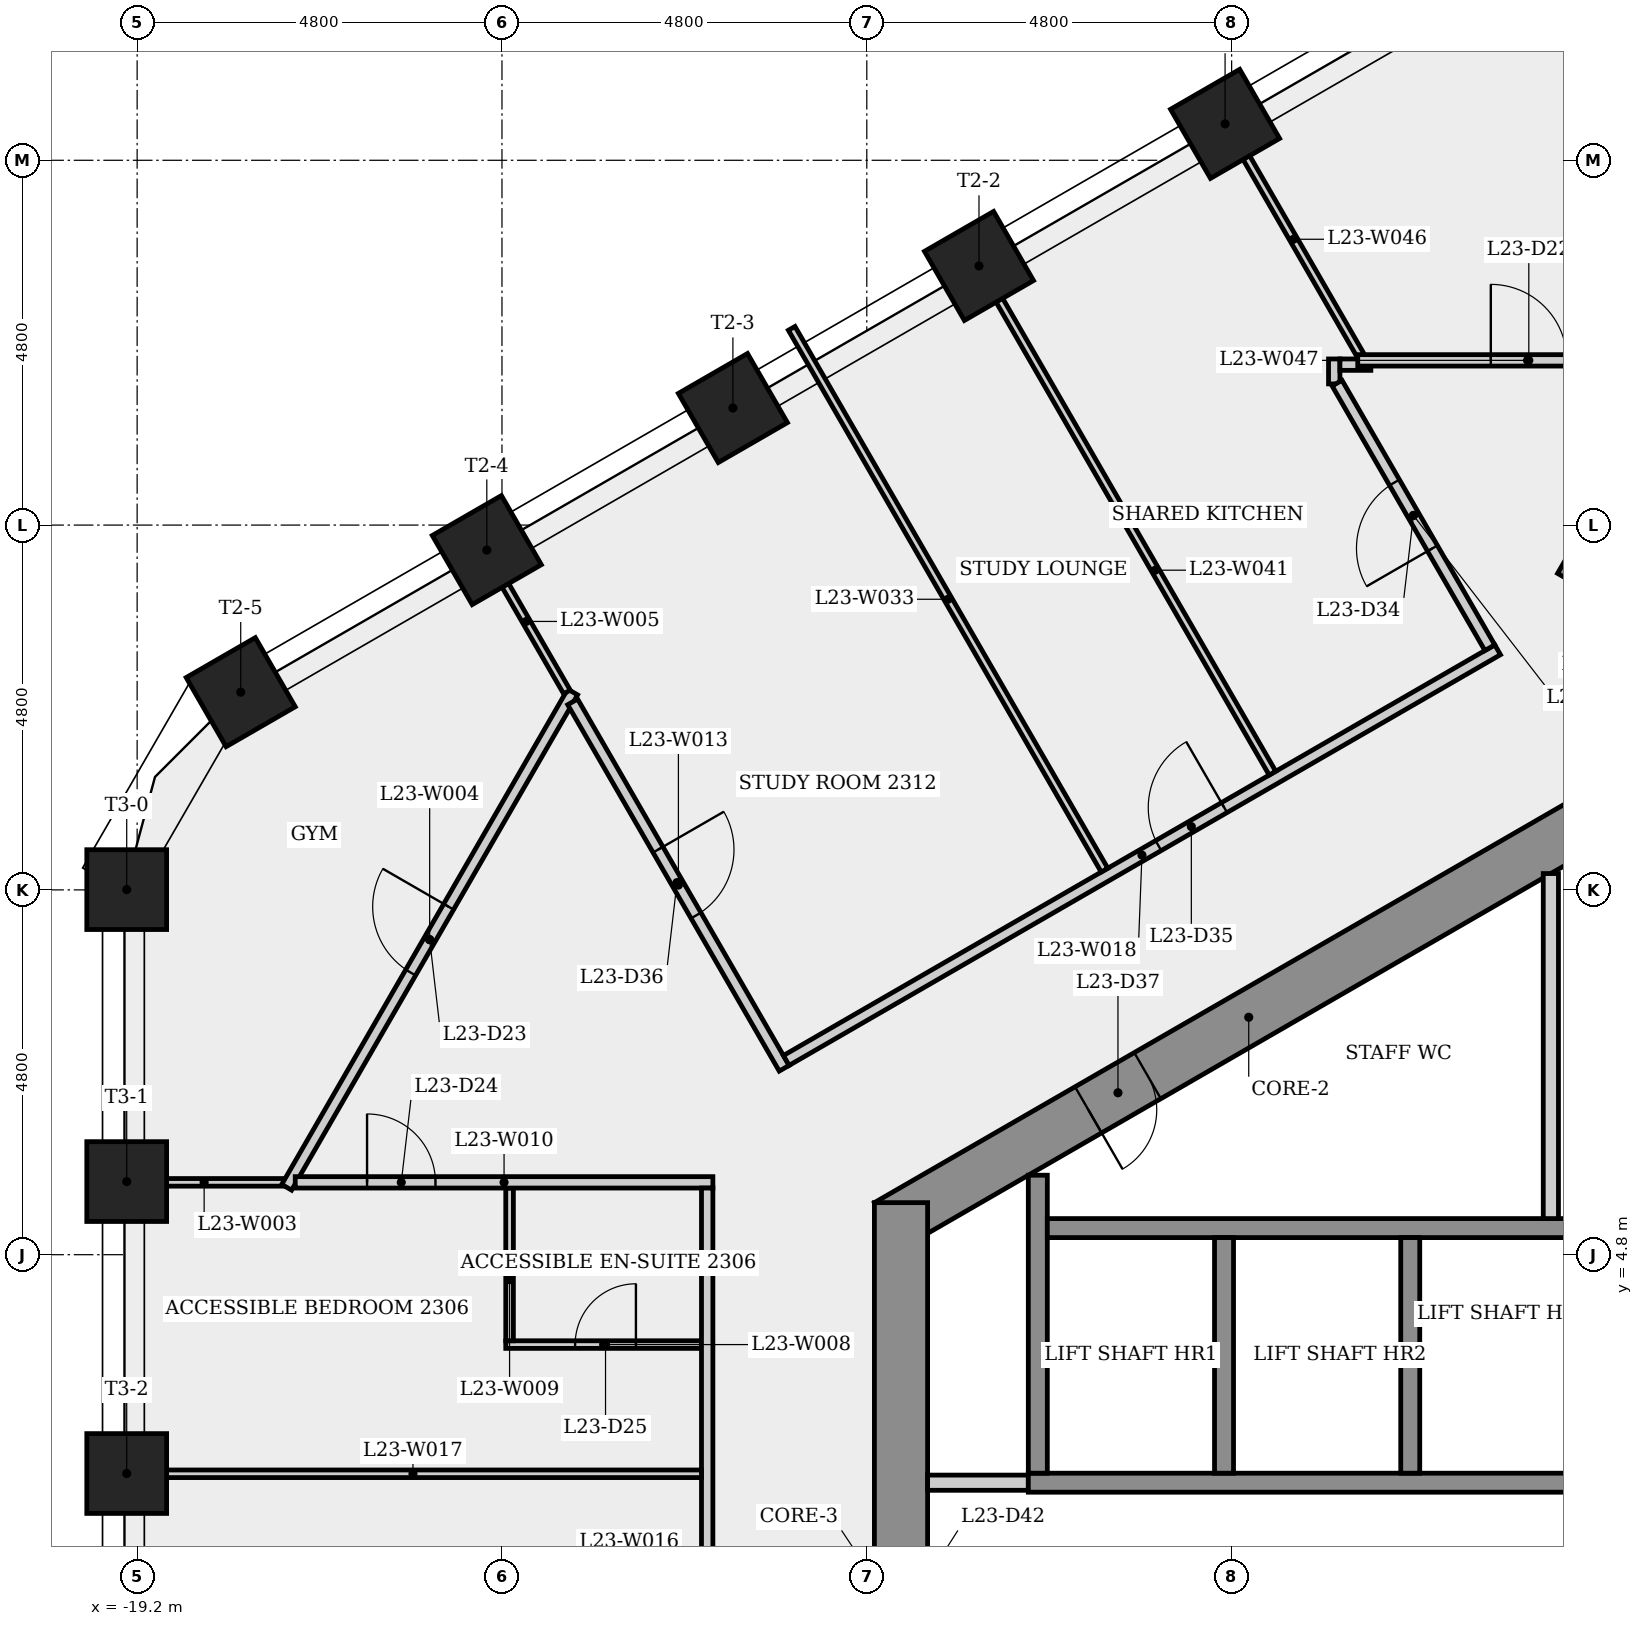
"""IFC4 building model, lengths in metres.
Left out: names, types, materials, properties, quantities, classifications, styles, units other than length and angle.
Written with IfcOpenShell. Run it as: python <this file> out.ifc"""

import sys

from ifc_helpers import new_model, si_unit, direction, frame, frame_2d, origin, origin_2d, place, context, subcontext, project, spatial, rectangle, extrude, element, fill, save


model = new_model("IFC4")
c1 = context("Model", 3, precision=1e-05, world=origin(), true_north=direction((0.0, 1.0)))
c2 = subcontext(c1, "Body", "Model", "MODEL_VIEW")
j1 = project(units=[si_unit("LENGTHUNIT", "METRE"), si_unit("PLANEANGLEUNIT", "RADIAN")], contexts=[c1])
p1 = place(None, origin())
s1 = spatial("IfcSite", under=j1, at=p1, CompositionType="ELEMENT")
p2 = place(p1, origin())
s2 = spatial("IfcBuilding", under=s1, at=p2, CompositionType="ELEMENT")
p3 = place(p2, frame((0.0, 0.0, 89.9)))
s3 = spatial("IfcBuildingStorey", under=s2, at=p3, CompositionType="ELEMENT", Elevation=89.9)
p4 = place(p3, frame((0.175, 10.667, 0.0), z_axis=(0.0, 0.0, 1.0), x_axis=(-0.866023993627, -0.500002442456, 0.0)))
e1 = element("IfcWall", 1, at=p4, inside=s3, PredefinedType="SHEAR", context=c2, shape_type="SweptSolid", body=[
    extrude(rectangle(XDim=10.97, YDim=0.7, at=frame_2d((5.485, 0.0))), origin(), (0.0, 0.0, 1.0), 3.4),
])
p5 = place(p4, frame((7.021, 0.0, 0.0)))
e2 = element("IfcOpeningElement", 2, at=p5, cuts=e1, PredefinedType="OPENING", context=c2, shape_type="SweptSolid", body=[
    extrude(rectangle(XDim=0.9, YDim=2.1, at=frame_2d((0.45, 1.05))), frame((0.0, 0.36, 0.0), z_axis=(0.0, -1.0, 0.0), x_axis=(1.0, 0.0, 0.0)), (0.0, 0.0, 1.0), 0.72),
])
p6 = place(p3, frame((-9.15, 5.485, 0.0), z_axis=(0.0, 0.0, 1.0), x_axis=(0.0, -1.0, 0.0)))
e3 = element("IfcWall", 3, at=p6, inside=s3, PredefinedType="SHEAR", context=c2, shape_type="SweptSolid", body=[
    extrude(rectangle(XDim=10.97, YDim=0.7, at=frame_2d((5.485, 0.0))), origin(), (0.0, 0.0, 1.0), 3.4),
])
p7 = place(p6, frame((4.685, 0.0, 0.0)))
e4 = element("IfcOpeningElement", 4, at=p7, cuts=e3, PredefinedType="OPENING", context=c2, shape_type="SweptSolid", body=[
    extrude(rectangle(XDim=1.6, YDim=2.1, at=frame_2d((0.8, 1.05))), frame((0.0, 0.36, 0.0), z_axis=(0.0, -1.0, 0.0), x_axis=(1.0, 0.0, 0.0)), (0.0, 0.0, 1.0), 0.72),
])
for number, where, z_axis, x_axis in (
    (5, (-4.886, 19.679, 0.0), (0.0, 0.0, 1.0), (-0.5, 0.866, 0.0)),
    (6, (-8.124, 17.81, 0.0), (0.0, 0.0, 1.0), (-0.5, 0.866, 0.0)),
    (7, (-11.362, 15.94, 0.0), (0.0, 0.0, 1.0), (-0.5, 0.866, 0.0)),
    (8, (-14.599, 14.071, 0.0), (0.0, 0.0, 1.0), (-0.5, 0.866, 0.0)),
    (9, (-17.837, 12.202, 0.0), (0.0, 0.0, 1.0), (-0.5, 0.866, 0.0)),
    (10, (-19.337, 9.604, 0.0), (0.0, 0.0, 1.0), (-1.0, 0.0, 0.0)),
    (11, (-19.337, 5.762, 0.0), (0.0, 0.0, 1.0), (-1.0, 0.0, 0.0)),
    (12, (-19.337, 1.921, 0.0), (0.0, 0.0, 1.0), (-1.0, 0.0, 0.0)),
):
    element("IfcColumn", number, at=place(p3, frame(where, z_axis=z_axis, x_axis=x_axis)), inside=s3, PredefinedType="COLUMN", context=c2, shape_type="SweptSolid", body=[
        extrude(rectangle(XDim=1.05, YDim=1.05, at=origin_2d()), origin(), (0.0, 0.0, 1.0), 3.4),
    ])
p8 = place(p3, frame((-17.27, 5.752, 0.0), z_axis=(0.0, 0.0, 1.0), x_axis=(-1.0, 0.0, 0.0)))
e13 = element("IfcWall", 13, at=p8, inside=s3, PredefinedType="PARTITIONING", context=c2, shape_type="SweptSolid", body=[
    extrude(rectangle(XDim=2.097, YDim=0.1, at=frame_2d((1.048, 0.0))), origin(), (0.0, 0.0, 1.0), 3.05),
])
p9 = place(p3, frame((-17.233, 5.687, 0.0), z_axis=(0.0, 0.0, 1.0), x_axis=(0.499994872161, 0.866028364324, 0.0)))
e14 = element("IfcWall", 14, at=p9, inside=s3, PredefinedType="PARTITIONING", context=c2, shape_type="SweptSolid", body=[
    extrude(rectangle(XDim=7.525, YDim=0.15, at=frame_2d((3.762, 0.0))), origin(), (0.0, 0.0, 1.0), 3.05),
])
p10 = place(p9, frame((3.262, 0.0, 0.0)))
e15 = element("IfcOpeningElement", 15, at=p10, cuts=e14, PredefinedType="OPENING", context=c2, shape_type="SweptSolid", body=[
    extrude(rectangle(XDim=1.0, YDim=2.1, at=frame_2d((0.5, 1.05))), frame((0.0, 0.085, 0.0), z_axis=(0.0, -1.0, 0.0), x_axis=(1.0, 0.0, 0.0)), (0.0, 0.0, 1.0), 0.17),
])
p11 = place(p3, frame((-14.617, 14.061, 0.0), z_axis=(0.0, 0.0, 1.0), x_axis=(0.499972147661, -0.866041483742, 0.0)))
e16 = element("IfcWall", 16, at=p11, inside=s3, PredefinedType="PARTITIONING", context=c2, shape_type="SweptSolid", body=[
    extrude(rectangle(XDim=2.144, YDim=0.1, at=frame_2d((1.072, 0.0))), origin(), (0.0, 0.0, 1.0), 3.05),
])
p12 = place(p3, frame((-14.35, 3.617, 0.0), z_axis=(0.0, 0.0, 1.0), x_axis=(1.0, 0.0, 0.0)))
e17 = element("IfcWall", 17, at=p12, inside=s3, PredefinedType="PARTITIONING", context=c2, shape_type="SweptSolid", body=[
    extrude(rectangle(XDim=2.575, YDim=0.1, at=frame_2d((1.288, 0.0))), origin(), (0.0, 0.0, 1.0), 3.05),
])
p13 = place(p12, frame((0.913, 0.0, 0.0)))
e18 = element("IfcOpeningElement", 18, at=p13, cuts=e17, PredefinedType="OPENING", context=c2, shape_type="SweptSolid", body=[
    extrude(rectangle(XDim=0.8, YDim=2.1, at=frame_2d((0.4, 1.05))), frame((0.0, 0.06, 0.0), z_axis=(0.0, -1.0, 0.0), x_axis=(1.0, 0.0, 0.0)), (0.0, 0.0, 1.0), 0.12),
])
p14 = place(p3, frame((-14.3, 5.677, 0.0), z_axis=(0.0, 0.0, 1.0), x_axis=(0.0, -1.0, 0.0)))
e19 = element("IfcWall", 19, at=p14, inside=s3, PredefinedType="PARTITIONING", context=c2, shape_type="SweptSolid", body=[
    extrude(rectangle(XDim=2.01, YDim=0.1, at=frame_2d((1.005, 0.0))), origin(), (0.0, 0.0, 1.0), 3.05),
])
p15 = place(p3, frame((-17.12, 5.752, 0.0), z_axis=(0.0, 0.0, 1.0), x_axis=(1.0, 0.0, 0.0)))
e20 = element("IfcWall", 20, at=p15, inside=s3, PredefinedType="PARTITIONING", context=c2, shape_type="SweptSolid", body=[
    extrude(rectangle(XDim=5.495, YDim=0.15, at=frame_2d((2.748, 0.0))), origin(), (0.0, 0.0, 1.0), 3.05),
])
p16 = place(p15, frame((0.945, 0.0, 0.0)))
e21 = element("IfcOpeningElement", 21, at=p16, cuts=e20, PredefinedType="OPENING", context=c2, shape_type="SweptSolid", body=[
    extrude(rectangle(XDim=0.9, YDim=2.1, at=frame_2d((0.45, 1.05))), frame((0.0, 0.085, 0.0), z_axis=(0.0, -1.0, 0.0), x_axis=(1.0, 0.0, 0.0)), (0.0, 0.0, 1.0), 0.17),
])
p17 = place(p3, frame((-13.47, 12.074, 0.0), z_axis=(0.0, 0.0, 1.0), x_axis=(0.500007201891, -0.866021245731, 0.0)))
e22 = element("IfcWall", 22, at=p17, inside=s3, PredefinedType="PARTITIONING", context=c2, shape_type="SweptSolid", body=[
    extrude(rectangle(XDim=5.566, YDim=0.15, at=frame_2d((2.783, 0.0))), origin(), (0.0, 0.0, 1.0), 3.05),
])
p18 = place(p17, frame((2.246, 0.0, 0.0)))
e23 = element("IfcOpeningElement", 23, at=p18, cuts=e22, PredefinedType="OPENING", context=c2, shape_type="SweptSolid", body=[
    extrude(rectangle(XDim=1.0, YDim=2.1, at=frame_2d((0.5, 1.05))), frame((0.0, 0.085, 0.0), z_axis=(0.0, -1.0, 0.0), x_axis=(1.0, 0.0, 0.0)), (0.0, 0.0, 1.0), 0.17),
])
p19 = place(p3, frame((-11.7, 5.677, 0.0), z_axis=(0.0, 0.0, 1.0), x_axis=(0.0, -1.0, 0.0)))
e24 = element("IfcWall", 24, at=p19, inside=s3, PredefinedType="PARTITIONING", context=c2, shape_type="SweptSolid", body=[
    extrude(rectangle(XDim=11.354, YDim=0.15, at=frame_2d((5.677, 0.0))), origin(), (0.0, 0.0, 1.0), 3.05),
])
p20 = place(p19, frame((5.79, 0.0, 0.0)))
e25 = element("IfcOpeningElement", 25, at=p20, cuts=e24, PredefinedType="OPENING", context=c2, shape_type="SweptSolid", body=[
    extrude(rectangle(XDim=1.0, YDim=2.1, at=frame_2d((0.5, 1.05))), frame((0.0, 0.085, 0.0), z_axis=(0.0, -1.0, 0.0), x_axis=(1.0, 0.0, 0.0)), (0.0, 0.0, 1.0), 0.17),
])
p21 = place(p3, frame((-11.775, 1.917, 0.0), z_axis=(0.0, 0.0, 1.0), x_axis=(-1.0, 0.0, 0.0)))
e26 = element("IfcWall", 26, at=p21, inside=s3, PredefinedType="PARTITIONING", context=c2, shape_type="SweptSolid", body=[
    extrude(rectangle(XDim=7.592, YDim=0.1, at=frame_2d((3.796, 0.0))), origin(), (0.0, 0.0, 1.0), 3.05),
])
p22 = place(p3, frame((-10.659, 7.356, 0.0), z_axis=(0.0, 0.0, 1.0), x_axis=(0.866022689903, 0.500004700551, 0.0)))
e27 = element("IfcWall", 27, at=p22, inside=s3, PredefinedType="PARTITIONING", context=c2, shape_type="SweptSolid", body=[
    extrude(rectangle(XDim=10.807, YDim=0.15, at=frame_2d((5.404, 0.0))), origin(), (0.0, 0.0, 1.0), 3.05),
])
p23 = place(p22, frame((5.654, 0.0, 0.0)))
e28 = element("IfcOpeningElement", 28, at=p23, cuts=e27, PredefinedType="OPENING", context=c2, shape_type="SweptSolid", body=[
    extrude(rectangle(XDim=1.0, YDim=2.1, at=frame_2d((0.5, 1.05))), frame((0.0, 0.085, 0.0), z_axis=(0.0, -1.0, 0.0), x_axis=(1.0, 0.0, 0.0)), (0.0, 0.0, 1.0), 0.17),
])
p24 = place(p3, frame((-8.8, 1.8, 0.0), z_axis=(0.0, 0.0, 1.0), x_axis=(1.0, 0.0, 0.0)))
e29 = element("IfcWall", 29, at=p24, inside=s3, PredefinedType="PARTITIONING", context=c2, shape_type="SweptSolid", body=[
    extrude(rectangle(XDim=1.325, YDim=0.2, at=frame_2d((0.663, 0.0))), origin(), (0.0, 0.0, 1.0), 3.05),
])
p25 = place(p3, frame((-7.475, 1.8, 0.0), z_axis=(0.0, 0.0, 1.0), x_axis=(1.0, 0.0, 0.0)))
e30 = element("IfcWall", 30, at=p25, inside=s3, PredefinedType="SHEAR", context=c2, shape_type="SweptSolid", body=[
    extrude(rectangle(XDim=14.95, YDim=0.25, at=frame_2d((7.475, 0.0))), origin(), (0.0, 0.0, 1.0), 3.05),
])
p26 = place(p3, frame((-7.35, 1.925, 0.0), z_axis=(0.0, 0.0, 1.0), x_axis=(0.0, 1.0, 0.0)))
e31 = element("IfcWall", 31, at=p26, inside=s3, PredefinedType="SHEAR", context=c2, shape_type="SweptSolid", body=[
    extrude(rectangle(XDim=3.921, YDim=0.25, at=frame_2d((1.96, 0.0))), origin(), (0.0, 0.0, 1.0), 3.05),
])
p27 = place(p3, frame((-7.225, 5.15, 0.0), z_axis=(0.0, 0.0, 1.0), x_axis=(1.0, 0.0, 0.0)))
e32 = element("IfcWall", 32, at=p27, inside=s3, PredefinedType="SHEAR", context=c2, shape_type="SweptSolid", body=[
    extrude(rectangle(XDim=14.7, YDim=0.25, at=frame_2d((7.35, 0.0))), origin(), (0.0, 0.0, 1.0), 3.05),
])
p28 = place(p3, frame((-6.472, 9.86, 0.0), z_axis=(0.0, 0.0, 1.0), x_axis=(-0.499986033803, 0.866033467022, 0.0)))
e33 = element("IfcWall", 33, at=p28, inside=s3, PredefinedType="PARTITIONING", context=c2, shape_type="SweptSolid", body=[
    extrude(rectangle(XDim=8.232, YDim=0.1, at=frame_2d((4.116, 0.0))), origin(), (0.0, 0.0, 1.0), 3.05),
])
p29 = place(p3, frame((-4.9, 5.025, 0.0), z_axis=(0.0, 0.0, 1.0), x_axis=(0.0, -1.0, 0.0)))
e34 = element("IfcWall", 34, at=p29, inside=s3, PredefinedType="SHEAR", context=c2, shape_type="SweptSolid", body=[
    extrude(rectangle(XDim=3.1, YDim=0.25, at=frame_2d((1.55, 0.0))), origin(), (0.0, 0.0, 1.0), 3.4),
])
p30 = place(p3, frame((-4.263, 11.135, 0.0), z_axis=(0.0, 0.0, 1.0), x_axis=(-0.499997453958, 0.866026873738, 0.0)))
e35 = element("IfcWall", 35, at=p30, inside=s3, PredefinedType="PARTITIONING", context=c2, shape_type="SweptSolid", body=[
    extrude(rectangle(XDim=7.71, YDim=0.1, at=frame_2d((3.855, 0.0))), origin(), (0.0, 0.0, 1.0), 3.05),
])
p31 = place(p3, frame((-3.45, 16.258, 0.0), z_axis=(0.0, 0.0, 1.0), x_axis=(0.0, 1.0, 0.0)))
e36 = element("IfcWall", 36, at=p31, inside=s3, PredefinedType="PARTITIONING", context=c2, shape_type="SweptSolid", body=[
    extrude(rectangle(XDim=0.328, YDim=0.15, at=frame_2d((0.164, 0.0))), origin(), (0.0, 0.0, 1.0), 3.05),
])
p32 = place(p3, frame((-3.375, 16.511, 0.0), z_axis=(0.0, 0.0, 1.0), x_axis=(1.0, 0.0, 0.0)))
e37 = element("IfcWall", 37, at=p32, inside=s3, PredefinedType="PARTITIONING", context=c2, shape_type="SweptSolid", body=[
    extrude(rectangle(XDim=0.406, YDim=0.15, at=frame_2d((0.203, 0.0))), origin(), (0.0, 0.0, 1.0), 3.05),
])
p33 = place(p3, frame((-3.104, 16.632, 0.0), z_axis=(0.0, 0.0, 1.0), x_axis=(-0.499999858875, 0.866025485263, 0.0)))
e38 = element("IfcWall", 38, at=p33, inside=s3, PredefinedType="PARTITIONING", context=c2, shape_type="SweptSolid", body=[
    extrude(rectangle(XDim=3.53, YDim=0.1, at=frame_2d((1.765, 0.0))), origin(), (0.0, 0.0, 1.0), 3.05),
])
p34 = place(p3, frame((-3.141, 16.567, 0.0), z_axis=(0.0, 0.0, 1.0), x_axis=(1.0, 0.0, 0.0)))
e39 = element("IfcWall", 39, at=p34, inside=s3, PredefinedType="PARTITIONING", context=c2, shape_type="SweptSolid", body=[
    extrude(rectangle(XDim=4.467, YDim=0.15, at=frame_2d((2.234, 0.0))), origin(), (0.0, 0.0, 1.0), 3.05),
])
p35 = place(p34, frame((1.751, 0.0, 0.0)))
e40 = element("IfcOpeningElement", 40, at=p35, cuts=e39, PredefinedType="OPENING", context=c2, shape_type="SweptSolid", body=[
    extrude(rectangle(XDim=1.0, YDim=2.1, at=frame_2d((0.5, 1.05))), frame((0.0, 0.085, 0.0), z_axis=(0.0, -1.0, 0.0), x_axis=(1.0, 0.0, 0.0)), (0.0, 0.0, 1.0), 0.17),
])
p36 = place(p3, frame((-2.45, 5.025, 0.0), z_axis=(0.0, 0.0, 1.0), x_axis=(0.0, -1.0, 0.0)))
e41 = element("IfcWall", 41, at=p36, inside=s3, PredefinedType="SHEAR", context=c2, shape_type="SweptSolid", body=[
    extrude(rectangle(XDim=3.1, YDim=0.25, at=frame_2d((1.55, 0.0))), origin(), (0.0, 0.0, 1.0), 3.4),
])
p37 = place(p3, frame((-1.403, 12.787, 0.0), z_axis=(0.0, 0.0, 1.0), x_axis=(-0.500006371327, 0.866021725266, 0.0)))
e42 = element("IfcWall", 42, at=p37, inside=s3, PredefinedType="PARTITIONING", context=c2, shape_type="SweptSolid", body=[
    extrude(rectangle(XDim=4.02, YDim=0.15, at=frame_2d((2.01, 0.0))), origin(), (0.0, 0.0, 1.0), 3.05),
])
p38 = place(p37, frame((1.51, 0.0, 0.0)))
e43 = element("IfcOpeningElement", 43, at=p38, cuts=e42, PredefinedType="OPENING", context=c2, shape_type="SweptSolid", body=[
    extrude(rectangle(XDim=1.0, YDim=2.1, at=frame_2d((0.5, 1.05))), frame((0.0, 0.085, 0.0), z_axis=(0.0, -1.0, 0.0), x_axis=(1.0, 0.0, 0.0)), (0.0, 0.0, 1.0), 0.17),
])
p39 = place(p3, frame((-0.6, 9.815, 0.0), z_axis=(0.0, 0.0, 1.0), x_axis=(0.0, -1.0, 0.0)))
e44 = element("IfcWall", 44, at=p39, inside=s3, PredefinedType="PARTITIONING", context=c2, shape_type="SweptSolid", body=[
    extrude(rectangle(XDim=4.54, YDim=0.2, at=frame_2d((2.27, 0.0))), origin(), (0.0, 0.0, 1.0), 3.05),
])
p40 = place(p3, frame((-0.403, 13.702, 0.0), z_axis=(0.0, 0.0, 1.0), x_axis=(0.499976111731, 0.866039195244, 0.0)))
e45 = element("IfcWall", 45, at=p40, inside=s3, PredefinedType="SHEAR", context=c2, shape_type="SweptSolid", body=[
    extrude(rectangle(XDim=2.861, YDim=0.25, at=frame_2d((1.43, 0.0))), origin(), (0.0, 0.0, 1.0), 3.05),
])
p41 = place(p35, origin())
e46 = element("IfcDoor", 46, at=p41, inside=s3, OperationType="SINGLE_SWING_LEFT", PredefinedType="DOOR", context=c2, shape_type="SweptSolid", body=[
    extrude(rectangle(XDim=1.0, YDim=2.1, at=frame_2d((0.5, 1.05))), frame((0.0, 0.025, 0.0), z_axis=(0.0, -1.0, 0.0), x_axis=(1.0, 0.0, 0.0)), (0.0, 0.0, 1.0), 0.05),
])
fill(e40, e46)
p42 = place(p10, origin())
e47 = element("IfcDoor", 47, at=p42, inside=s3, OperationType="SINGLE_SWING_RIGHT", PredefinedType="DOOR", context=c2, shape_type="SweptSolid", body=[
    extrude(rectangle(XDim=1.0, YDim=2.1, at=frame_2d((0.5, 1.05))), frame((0.0, 0.025, 0.0), z_axis=(0.0, -1.0, 0.0), x_axis=(1.0, 0.0, 0.0)), (0.0, 0.0, 1.0), 0.05),
])
fill(e15, e47)
p43 = place(p16, origin())
e48 = element("IfcDoor", 48, at=p43, inside=s3, OperationType="SINGLE_SWING_LEFT", PredefinedType="DOOR", context=c2, shape_type="SweptSolid", body=[
    extrude(rectangle(XDim=0.9, YDim=2.1, at=frame_2d((0.45, 1.05))), frame((0.0, 0.025, 0.0), z_axis=(0.0, -1.0, 0.0), x_axis=(1.0, 0.0, 0.0)), (0.0, 0.0, 1.0), 0.05),
])
fill(e21, e48)
p44 = place(p13, origin())
e49 = element("IfcDoor", 49, at=p44, inside=s3, OperationType="SINGLE_SWING_RIGHT", PredefinedType="DOOR", context=c2, shape_type="SweptSolid", body=[
    extrude(rectangle(XDim=0.8, YDim=2.1, at=frame_2d((0.4, 1.05))), frame((0.0, 0.025, 0.0), z_axis=(0.0, -1.0, 0.0), x_axis=(1.0, 0.0, 0.0)), (0.0, 0.0, 1.0), 0.05),
])
fill(e18, e49)
p45 = place(p38, origin())
e50 = element("IfcDoor", 50, at=p45, inside=s3, OperationType="SINGLE_SWING_LEFT", PredefinedType="DOOR", context=c2, shape_type="SweptSolid", body=[
    extrude(rectangle(XDim=1.0, YDim=2.1, at=frame_2d((0.5, 1.05))), frame((0.0, 0.025, 0.0), z_axis=(0.0, -1.0, 0.0), x_axis=(1.0, 0.0, 0.0)), (0.0, 0.0, 1.0), 0.05),
])
fill(e43, e50)
p46 = place(p23, origin())
e51 = element("IfcDoor", 51, at=p46, inside=s3, OperationType="SINGLE_SWING_RIGHT", PredefinedType="DOOR", context=c2, shape_type="SweptSolid", body=[
    extrude(rectangle(XDim=1.0, YDim=2.1, at=frame_2d((0.5, 1.05))), frame((0.0, 0.025, 0.0), z_axis=(0.0, -1.0, 0.0), x_axis=(1.0, 0.0, 0.0)), (0.0, 0.0, 1.0), 0.05),
])
fill(e28, e51)
p47 = place(p18, origin())
e52 = element("IfcDoor", 52, at=p47, inside=s3, OperationType="SINGLE_SWING_LEFT", PredefinedType="DOOR", context=c2, shape_type="SweptSolid", body=[
    extrude(rectangle(XDim=1.0, YDim=2.1, at=frame_2d((0.5, 1.05))), frame((0.0, 0.025, 0.0), z_axis=(0.0, -1.0, 0.0), x_axis=(1.0, 0.0, 0.0)), (0.0, 0.0, 1.0), 0.05),
])
fill(e23, e52)
p48 = place(p5, origin())
e53 = element("IfcDoor", 53, at=p48, inside=s3, OperationType="SINGLE_SWING_RIGHT", PredefinedType="DOOR", context=c2, shape_type="SweptSolid", body=[
    extrude(rectangle(XDim=0.9, YDim=2.1, at=frame_2d((0.45, 1.05))), frame((0.0, 0.025, 0.0), z_axis=(0.0, -1.0, 0.0), x_axis=(1.0, 0.0, 0.0)), (0.0, 0.0, 1.0), 0.05),
])
fill(e2, e53)
save(model, sys.argv[1])
